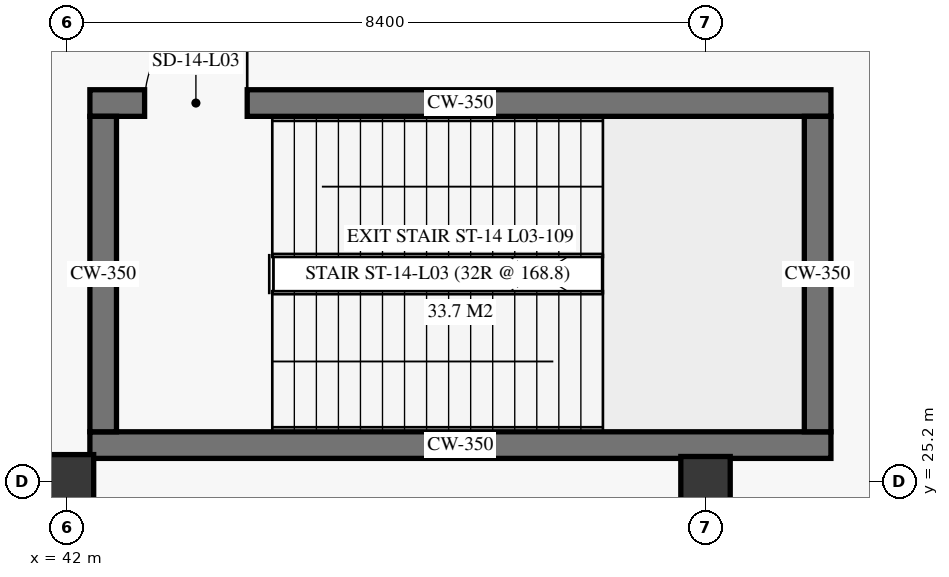
"""IFC4 building model, lengths in metres.
Left out: names, types, materials, properties, quantities, classifications, styles, units other than length and angle.
Written with IfcOpenShell. Run it as: python <this file> out.ifc"""

import sys

from ifc_helpers import new_model, si_unit, direction, frame, frame_2d, origin, origin_2d, place, context, subcontext, project, spatial, rectangle, extrude, element, fill, save


model = new_model("IFC4")
c1 = context("Model", 3, precision=1e-05, world=origin(), true_north=direction((0.0, 1.0)))
c2 = subcontext(c1, "Body", "Model", "MODEL_VIEW")
j1 = project(units=[si_unit("LENGTHUNIT", "METRE"), si_unit("PLANEANGLEUNIT", "RADIAN")], contexts=[c1])
p1 = place(None, origin())
s1 = spatial("IfcSite", under=j1, at=p1, CompositionType="ELEMENT")
p2 = place(p1, origin())
s2 = spatial("IfcBuilding", under=s1, at=p2, CompositionType="ELEMENT")
p3 = place(p2, frame((0.0, 0.0, 11.4)))
s3 = spatial("IfcBuildingStorey", under=s2, at=p3, CompositionType="ELEMENT", Elevation=11.4)
p4 = place(p3, frame((42.0, 25.2, 0.0), z_axis=(0.0, 0.0, 1.0), x_axis=(1.0, 0.0, 0.0)))
e1 = element("IfcColumn", 1, at=p4, inside=s3, PredefinedType="COLUMN", context=c2, shape_type="SweptSolid", body=[
    extrude(rectangle(XDim=0.7, YDim=0.7, at=origin_2d()), origin(), (0.0, 0.0, 1.0), 5.1),
])
p5 = place(p3, frame((50.4, 25.2, 0.0), z_axis=(0.0, 0.0, 1.0), x_axis=(1.0, 0.0, 0.0)))
e2 = element("IfcColumn", 2, at=p5, inside=s3, PredefinedType="COLUMN", context=c2, shape_type="SweptSolid", body=[
    extrude(rectangle(XDim=0.65, YDim=0.65, at=origin_2d()), origin(), (0.0, 0.0, 1.0), 5.1),
])
p6 = place(p3, frame((42.3, 25.675, 0.0), z_axis=(0.0, 0.0, 1.0), x_axis=(1.0, 0.0, 0.0)))
e3 = element("IfcWall", 3, at=p6, inside=s3, PredefinedType="SHEAR", context=c2, shape_type="SweptSolid", body=[
    extrude(rectangle(XDim=9.75, YDim=0.35, at=frame_2d((4.875, 0.0))), origin(), (0.0, 0.0, 1.0), 5.1),
])
p7 = place(p3, frame((42.3, 30.175, 0.0), z_axis=(0.0, 0.0, 1.0), x_axis=(1.0, 0.0, 0.0)))
e4 = element("IfcWall", 4, at=p7, inside=s3, PredefinedType="SHEAR", context=c2, shape_type="SweptSolid", body=[
    extrude(rectangle(XDim=9.75, YDim=0.35, at=frame_2d((4.875, 0.0))), origin(), (0.0, 0.0, 1.0), 5.1),
])
p8 = place(p7, frame((0.72, 0.0, 0.0)))
e5 = element("IfcOpeningElement", 5, at=p8, cuts=e4, PredefinedType="OPENING", context=c2, shape_type="SweptSolid", body=[
    extrude(rectangle(XDim=1.35, YDim=2.25, at=frame_2d((0.675, 1.125))), frame((0.0, 0.185, 0.0), z_axis=(0.0, -1.0, 0.0), x_axis=(1.0, 0.0, 0.0)), (0.0, 0.0, 1.0), 0.37),
])
for number, where, z_axis, x_axis in (
    (6, (42.475, 25.85, 0.0), (0.0, 0.0, 1.0), (0.0, 1.0, 0.0)),
    (7, (51.875, 25.85, 0.0), (0.0, 0.0, 1.0), (0.0, 1.0, 0.0)),
):
    element("IfcWall", number, at=place(p3, frame(where, z_axis=z_axis, x_axis=x_axis)), inside=s3, PredefinedType="SHEAR", context=c2, shape_type="SweptSolid", body=[
        extrude(rectangle(XDim=4.15, YDim=0.35, at=frame_2d((2.075, 0.0))), origin(), (0.0, 0.0, 1.0), 5.1),
    ])
p9 = place(p8, origin())
e8 = element("IfcDoor", 8, at=p9, inside=s3, OperationType="SINGLE_SWING_RIGHT", PredefinedType="DOOR", context=c2, shape_type="SweptSolid", body=[
    extrude(rectangle(XDim=1.35, YDim=2.25, at=frame_2d((0.675, 1.125))), frame((0.0, 0.025, 0.0), z_axis=(0.0, -1.0, 0.0), x_axis=(1.0, 0.0, 0.0)), (0.0, 0.0, 1.0), 0.05),
])
fill(e5, e8)
save(model, sys.argv[1])
